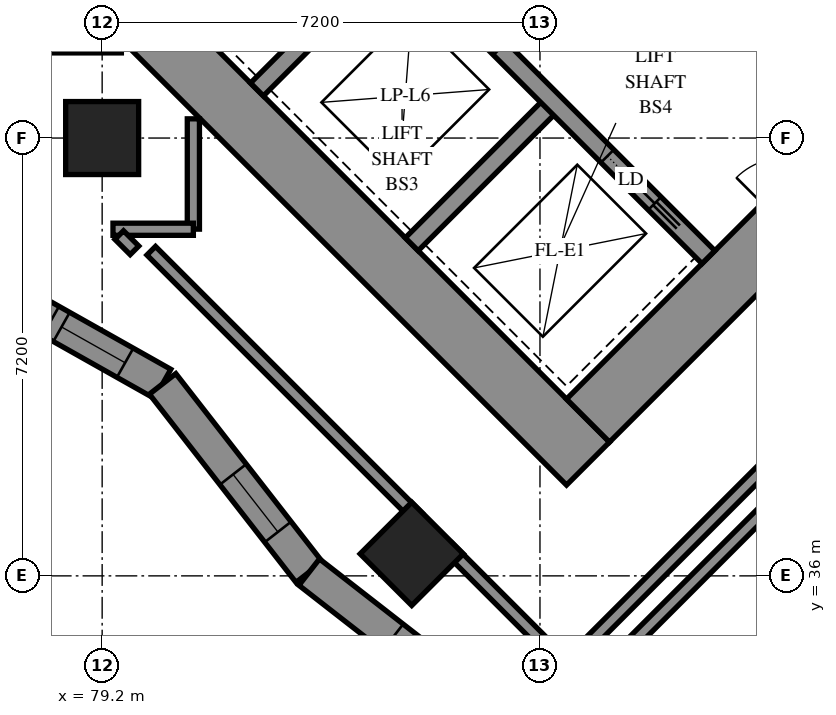
"""IFC4 building model, lengths in metres.
Left out: names, types, materials, properties, quantities, classifications, styles, units other than length and angle.
Written with IfcOpenShell. Run it as: python <this file> out.ifc"""

import sys

from ifc_helpers import new_model, si_unit, direction, frame, frame_2d, origin, origin_2d, place, context, subcontext, project, spatial, polyline, rectangle, outline, extrude, element, fill, save


model = new_model("IFC4")
c1 = context("Model", 3, precision=1e-05, world=origin(), true_north=direction((0.0, 1.0)))
c2 = subcontext(c1, "Body", "Model", "MODEL_VIEW")
j1 = project(units=[si_unit("LENGTHUNIT", "METRE"), si_unit("PLANEANGLEUNIT", "RADIAN")], contexts=[c1])
p1 = place(None, origin())
s1 = spatial("IfcSite", under=j1, at=p1, CompositionType="ELEMENT")
p2 = place(p1, origin())
s2 = spatial("IfcBuilding", under=s1, at=p2, CompositionType="ELEMENT")
p3 = place(p2, frame((0.0, 0.0, 47.4)))
s3 = spatial("IfcBuildingStorey", under=s2, at=p3, CompositionType="ELEMENT", Elevation=47.4)
for number, where, z_axis, x_axis in (
    (1, (79.2, 43.2, 0.0), (0.0, 0.0, 1.0), (1.0, 0.0, 0.0)),
    (2, (84.291, 36.362, 0.0), (0.0, 0.0, 1.0), (0.707, -0.707, 0.0)),
):
    element("IfcColumn", number, at=place(p3, frame(where, z_axis=z_axis, x_axis=x_axis)), inside=s3, PredefinedType="COLUMN", context=c2, shape_type="SweptSolid", body=[
        extrude(rectangle(XDim=1.2, YDim=1.2, at=origin_2d()), origin(), (0.0, 0.0, 1.0), 3.1),
    ])
p4 = place(p3, frame((75.594, 49.443, -0.3), z_axis=(0.0, 0.0, 1.0), x_axis=(0.7071037324, -0.70710983, 0.0)))
e3 = element("IfcWall", 3, at=p4, inside=s3, PredefinedType="SHEAR", context=c2, shape_type="SweptSolid", body=[
    extrude(rectangle(XDim=16.4, YDim=1.0, at=frame_2d((8.2, 0.0))), origin(), (0.0, 0.0, 1.0), 2.7),
])
p5 = place(p3, frame((87.19, 38.554, -0.3), z_axis=(0.0, 0.0, 1.0), x_axis=(0.707103309, 0.7071102534, 0.0)))
e4 = element("IfcWall", 4, at=p5, inside=s3, PredefinedType="SHEAR", context=c2, shape_type="SweptSolid", body=[
    extrude(rectangle(XDim=14.4, YDim=1.0, at=frame_2d((7.2, 0.0))), origin(), (0.0, 0.0, 1.0), 2.7),
])
p6 = place(p5, frame((4.55, 0.0, 0.3)))
e5 = element("IfcOpeningElement", 5, at=p6, cuts=e4, PredefinedType="OPENING", context=c2, shape_type="SweptSolid", body=[
    extrude(rectangle(XDim=1.1, YDim=2.1, at=frame_2d((0.55, 1.05))), frame((0.0, 0.51, 0.0), z_axis=(0.0, -1.0, 0.0), x_axis=(1.0, 0.0, 0.0)), (0.0, 0.0, 1.0), 1.02),
])
p7 = place(p5, frame((11.35, 0.0, 0.3)))
e6 = element("IfcOpeningElement", 6, at=p7, cuts=e4, PredefinedType="OPENING", context=c2, shape_type="SweptSolid", body=[
    extrude(rectangle(XDim=1.1, YDim=2.1, at=frame_2d((0.55, 1.05))), frame((0.0, 0.51, 0.0), z_axis=(0.0, -1.0, 0.0), x_axis=(1.0, 0.0, 0.0)), (0.0, 0.0, 1.0), 1.02),
])
for number, where, z_axis, x_axis in (
    (7, (81.746, 43.999, 0.0), (0.0, 0.0, 1.0), (0.707, 0.707, 0.0)),
    (8, (84.291, 41.453, 0.0), (0.0, 0.0, 1.0), (0.707, 0.707, 0.0)),
):
    element("IfcWall", number, at=place(p3, frame(where, z_axis=z_axis, x_axis=x_axis)), inside=s3, PredefinedType="SOLIDWALL", context=c2, shape_type="SweptSolid", body=[
        extrude(rectangle(XDim=3.3, YDim=0.3, at=frame_2d((1.65, 0.0))), origin(), (0.0, 0.0, 1.0), 3.1),
    ])
p8 = place(p3, frame((78.988, 51.423, 0.0), z_axis=(0.0, 0.0, 1.0), x_axis=(0.7071067812, -0.7071067812, 0.0)))
e9 = element("IfcWall", 9, at=p8, inside=s3, PredefinedType="SOLIDWALL", context=c2, shape_type="SweptSolid", body=[
    extrude(rectangle(XDim=14.4, YDim=0.3, at=frame_2d((7.2, 0.0))), origin(), (0.0, 0.0, 1.0), 3.1),
])
p9 = place(p8, frame((1.25, 0.0, 0.0)))
e10 = element("IfcOpeningElement", 10, at=p9, cuts=e9, PredefinedType="OPENING", context=c2, shape_type="SweptSolid", body=[
    extrude(rectangle(XDim=1.1, YDim=2.1, at=frame_2d((0.55, 1.05))), frame((0.0, 0.16, 0.0), z_axis=(0.0, -1.0, 0.0), x_axis=(1.0, 0.0, 0.0)), (0.0, 0.0, 1.0), 0.32),
])
p10 = place(p8, frame((4.85, 0.0, 0.0)))
e11 = element("IfcOpeningElement", 11, at=p10, cuts=e9, PredefinedType="OPENING", context=c2, shape_type="SweptSolid", body=[
    extrude(rectangle(XDim=1.1, YDim=2.1, at=frame_2d((0.55, 1.05))), frame((0.0, 0.16, 0.0), z_axis=(0.0, -1.0, 0.0), x_axis=(1.0, 0.0, 0.0)), (0.0, 0.0, 1.0), 0.32),
])
p11 = place(p8, frame((8.45, 0.0, 0.0)))
e12 = element("IfcOpeningElement", 12, at=p11, cuts=e9, PredefinedType="OPENING", context=c2, shape_type="SweptSolid", body=[
    extrude(rectangle(XDim=1.1, YDim=2.1, at=frame_2d((0.55, 1.05))), frame((0.0, 0.16, 0.0), z_axis=(0.0, -1.0, 0.0), x_axis=(1.0, 0.0, 0.0)), (0.0, 0.0, 1.0), 0.32),
])
p12 = place(p8, frame((12.05, 0.0, 0.0)))
e13 = element("IfcOpeningElement", 13, at=p12, cuts=e9, PredefinedType="OPENING", context=c2, shape_type="SweptSolid", body=[
    extrude(rectangle(XDim=1.1, YDim=2.1, at=frame_2d((0.55, 1.05))), frame((0.0, 0.16, 0.0), z_axis=(0.0, -1.0, 0.0), x_axis=(1.0, 0.0, 0.0)), (0.0, 0.0, 1.0), 0.32),
])
p13 = place(p3, frame((81.534, 53.969, 0.0), z_axis=(0.0, 0.0, 1.0), x_axis=(0.707103309, -0.7071102534, 0.0)))
e14 = element("IfcWall", 14, at=p13, inside=s3, PredefinedType="SOLIDWALL", context=c2, shape_type="SweptSolid", body=[
    extrude(rectangle(XDim=14.4, YDim=0.3, at=frame_2d((7.2, 0.0))), origin(), (0.0, 0.0, 1.0), 3.1),
])
p14 = place(p13, frame((12.05, 0.0, 0.0)))
e15 = element("IfcOpeningElement", 15, at=p14, cuts=e14, PredefinedType="OPENING", context=c2, shape_type="SweptSolid", body=[
    extrude(rectangle(XDim=1.1, YDim=2.1, at=frame_2d((0.55, 1.05))), frame((0.0, 0.16, 0.0), z_axis=(0.0, -1.0, 0.0), x_axis=(1.0, 0.0, 0.0)), (0.0, 0.0, 1.0), 0.32),
])
p15 = place(p3, frame((76.618, 41.172, 0.0), z_axis=(0.0, 0.0, 1.0), x_axis=(0.8713014776, -0.4907481381, 0.0)))
e16 = element("IfcWall", 16, at=p15, inside=s3, PredefinedType="SOLIDWALL", context=c2, shape_type="SweptSolid", body=[
    extrude(outline(polyline([(0.028, -0.275), (4.049, -0.275), (4.16, 0.275), (-0.028, 0.275), (0.028, -0.275)])), origin(), (0.0, 0.0, 1.0), 3.1),
])
p16 = place(p15, frame((0.795, 0.0, 0.5)))
e17 = element("IfcOpeningElement", 17, at=p16, cuts=e16, PredefinedType="OPENING", context=c2, shape_type="SweptSolid", body=[
    extrude(rectangle(XDim=1.2, YDim=2.45, at=frame_2d((0.6, 1.225))), frame((0.0, 0.285, 0.0), z_axis=(0.0, -1.0, 0.0), x_axis=(1.0, 0.0, 0.0)), (0.0, 0.0, 1.0), 0.57),
])
p17 = place(p15, frame((2.197, 0.0, 0.5)))
e18 = element("IfcOpeningElement", 18, at=p17, cuts=e16, PredefinedType="OPENING", context=c2, shape_type="SweptSolid", body=[
    extrude(rectangle(XDim=1.2, YDim=2.45, at=frame_2d((0.6, 1.225))), frame((0.0, 0.285, 0.0), z_axis=(0.0, -1.0, 0.0), x_axis=(1.0, 0.0, 0.0)), (0.0, 0.0, 1.0), 0.57),
])
p18 = place(p3, frame((80.194, 39.157, 0.0), z_axis=(0.0, 0.0, 1.0), x_axis=(0.6143428557, -0.7890391978, 0.0)))
e19 = element("IfcWall", 19, at=p18, inside=s3, PredefinedType="SOLIDWALL", context=c2, shape_type="SweptSolid", body=[
    extrude(outline(polyline([(0.055, -0.275), (3.958, -0.275), (3.889, 0.275), (-0.055, 0.275), (0.055, -0.275)])), origin(), (0.0, 0.0, 1.0), 3.1),
])
p19 = place(p18, frame((1.886, 0.0, 0.5)))
e20 = element("IfcOpeningElement", 20, at=p19, cuts=e19, PredefinedType="OPENING", context=c2, shape_type="SweptSolid", body=[
    extrude(rectangle(XDim=1.2, YDim=2.45, at=frame_2d((0.6, 1.225))), frame((0.0, 0.285, 0.0), z_axis=(0.0, -1.0, 0.0), x_axis=(1.0, 0.0, 0.0)), (0.0, 0.0, 1.0), 0.57),
])
p20 = place(p3, frame((82.605, 36.062, 0.0), z_axis=(0.0, 0.0, 1.0), x_axis=(0.7890333801, -0.6143503276, 0.0)))
e21 = element("IfcWall", 21, at=p20, inside=s3, PredefinedType="SOLIDWALL", context=c2, shape_type="SweptSolid", body=[
    extrude(outline(polyline([(-0.034, -0.275), (3.868, -0.275), (3.937, 0.275), (0.034, 0.275), (-0.034, -0.275)])), origin(), (0.0, 0.0, 1.0), 3.1),
])
p21 = place(p20, frame((1.745, 0.0, 0.5)))
e22 = element("IfcOpeningElement", 22, at=p21, cuts=e21, PredefinedType="OPENING", context=c2, shape_type="SweptSolid", body=[
    extrude(rectangle(XDim=1.2, YDim=2.45, at=frame_2d((0.6, 1.225))), frame((0.0, 0.285, 0.0), z_axis=(0.0, -1.0, 0.0), x_axis=(1.0, 0.0, 0.0)), (0.0, 0.0, 1.0), 0.57),
])
p22 = place(p3, frame((86.317, 33.298, 0.0), z_axis=(0.0, 0.0, 1.0), x_axis=(0.7071020793, 0.7071114831, 0.0)))
e23 = element("IfcWall", 23, at=p22, inside=s3, PredefinedType="PARTITIONING", context=c2, shape_type="SweptSolid", body=[
    extrude(rectangle(XDim=10.634, YDim=0.2, at=frame_2d((5.317, 0.0))), origin(), (0.0, 0.0, 1.0), 3.1),
])
p23 = place(p3, frame((86.836, 34.524, 0.0), z_axis=(0.0, 0.0, 1.0), x_axis=(0.7071067812, 0.7071067812, 0.0)))
e24 = element("IfcWall", 24, at=p23, inside=s3, PredefinedType="PARTITIONING", context=c2, shape_type="SweptSolid", body=[
    extrude(rectangle(XDim=9.399, YDim=0.2, at=frame_2d((4.699, 0.0))), origin(), (0.0, 0.0, 1.0), 3.1),
])
p24 = place(p3, frame((80.007, 41.347, 0.0), z_axis=(0.0, 0.0, 1.0), x_axis=(0.7071067812, -0.7071067812, 0.0)))
e25 = element("IfcWall", 25, at=p24, inside=s3, PredefinedType="PARTITIONING", context=c2, shape_type="SweptSolid", body=[
    extrude(rectangle(XDim=6.206, YDim=0.2, at=frame_2d((3.103, 0.0))), origin(), (0.0, 0.0, 1.0), 3.1),
])
p25 = place(p3, frame((84.889, 36.465, 0.0), z_axis=(0.0, 0.0, 1.0), x_axis=(0.7071067812, -0.7071067812, 0.0)))
e26 = element("IfcWall", 26, at=p25, inside=s3, PredefinedType="PARTITIONING", context=c2, shape_type="SweptSolid", body=[
    extrude(rectangle(XDim=2.749, YDim=0.2, at=frame_2d((1.375, 0.0))), origin(), (0.0, 0.0, 1.0), 3.1),
])
for number, where, z_axis, x_axis in (
    (27, (77.702, 44.7, 0.0), (0.0, 0.0, 1.0), (1.0, 0.0, 0.0)),
    (28, (80.7, 41.702, 0.0), (0.0, 0.0, 1.0), (0.0, 1.0, 0.0)),
):
    element("IfcWall", number, at=place(p3, frame(where, z_axis=z_axis, x_axis=x_axis)), inside=s3, PredefinedType="PARTITIONING", context=c2, shape_type="SweptSolid", body=[
        extrude(rectangle(XDim=1.814, YDim=0.2, at=frame_2d((0.907, 0.0))), origin(), (0.0, 0.0, 1.0), 3.1),
    ])
p26 = place(p3, frame((79.378, 41.7, 0.0), z_axis=(0.0, 0.0, 1.0), x_axis=(1.0, 0.0, 0.0)))
e29 = element("IfcWall", 29, at=p26, inside=s3, PredefinedType="PARTITIONING", context=c2, shape_type="SweptSolid", body=[
    extrude(rectangle(XDim=1.322, YDim=0.2, at=frame_2d((0.661, 0.0))), origin(), (0.0, 0.0, 1.0), 3.1),
])
p27 = place(p3, frame((79.481, 41.605, 0.0), z_axis=(0.0, 0.0, 1.0), x_axis=(0.7071067812, -0.7071067812, 0.0)))
e30 = element("IfcWall", 30, at=p27, inside=s3, PredefinedType="PARTITIONING", context=c2, shape_type="SweptSolid", body=[
    extrude(rectangle(XDim=0.355, YDim=0.2, at=frame_2d((0.177, 0.0))), origin(), (0.0, 0.0, 1.0), 3.1),
])
p28 = place(p16, origin())
e31 = element("IfcWindow", 31, at=p28, inside=s3, PartitioningType="SINGLE_PANEL", PredefinedType="WINDOW", context=c2, shape_type="SweptSolid", body=[
    extrude(rectangle(XDim=1.2, YDim=2.45, at=frame_2d((0.6, 1.225))), frame((0.0, 0.155, 0.0), z_axis=(0.0, -1.0, 0.0), x_axis=(1.0, 0.0, 0.0)), (0.0, 0.0, 1.0), 0.06),
])
fill(e17, e31)
p29 = place(p17, origin())
e32 = element("IfcWindow", 32, at=p29, inside=s3, PartitioningType="SINGLE_PANEL", PredefinedType="WINDOW", context=c2, shape_type="SweptSolid", body=[
    extrude(rectangle(XDim=1.2, YDim=2.45, at=frame_2d((0.6, 1.225))), frame((0.0, 0.155, 0.0), z_axis=(0.0, -1.0, 0.0), x_axis=(1.0, 0.0, 0.0)), (0.0, 0.0, 1.0), 0.06),
])
fill(e18, e32)
p30 = place(p19, origin())
e33 = element("IfcWindow", 33, at=p30, inside=s3, PartitioningType="SINGLE_PANEL", PredefinedType="WINDOW", context=c2, shape_type="SweptSolid", body=[
    extrude(rectangle(XDim=1.2, YDim=2.45, at=frame_2d((0.6, 1.225))), frame((0.0, 0.155, 0.0), z_axis=(0.0, -1.0, 0.0), x_axis=(1.0, 0.0, 0.0)), (0.0, 0.0, 1.0), 0.06),
])
fill(e20, e33)
p31 = place(p21, origin())
e34 = element("IfcWindow", 34, at=p31, inside=s3, PartitioningType="SINGLE_PANEL", PredefinedType="WINDOW", context=c2, shape_type="SweptSolid", body=[
    extrude(rectangle(XDim=1.2, YDim=2.45, at=frame_2d((0.6, 1.225))), frame((0.0, 0.155, 0.0), z_axis=(0.0, -1.0, 0.0), x_axis=(1.0, 0.0, 0.0)), (0.0, 0.0, 1.0), 0.06),
])
fill(e22, e34)
p32 = place(p12, origin())
e35 = element("IfcDoor", 35, at=p32, inside=s3, OperationType="SLIDING_TO_RIGHT", PredefinedType="DOOR", context=c2, shape_type="SweptSolid", body=[
    extrude(rectangle(XDim=1.1, YDim=2.1, at=frame_2d((0.55, 1.05))), frame((0.0, 0.025, 0.0), z_axis=(0.0, -1.0, 0.0), x_axis=(1.0, 0.0, 0.0)), (0.0, 0.0, 1.0), 0.05),
])
fill(e13, e35)
save(model, sys.argv[1])
